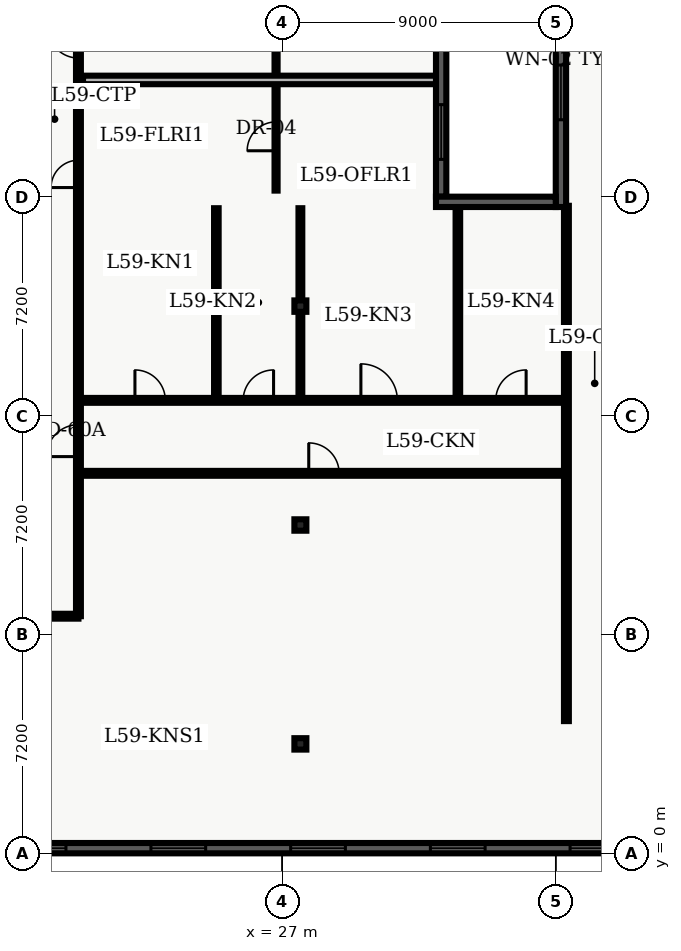
"""IFC4 building model, lengths in metres.
Left out: names, types, materials, properties, quantities, classifications, styles, units other than length and angle.
Written with IfcOpenShell. Run it as: python <this file> out.ifc"""

import sys

from ifc_helpers import new_model, entity, si_unit, converted_unit, direction, frame, origin_with_axes, origin_2d_with_axis, place, context, subcontext, project, spatial, polyline, rectangle, i_section, outline, extrude, element, fill, save


model = new_model("IFC4")
c1 = context("Model", 3, precision=1e-05, world=origin_with_axes(), true_north=direction((0.0, 1.0)))
c2 = subcontext(c1, "Body", "Model", "MODEL_VIEW")
j1 = project(units=[si_unit("LENGTHUNIT", "METRE"), converted_unit("PLANEANGLEUNIT", "DEGREE", entity("IfcPlaneAngleMeasure", 0.017), si_unit("PLANEANGLEUNIT", "RADIAN"), dimensions=[0, 0, 0, 0, 0, 0, 0])], contexts=[c1])
p1 = place(None, origin_with_axes())
s1 = spatial("IfcSite", under=j1, at=p1, CompositionType="ELEMENT")
p2 = place(p1, origin_with_axes())
s2 = spatial("IfcBuilding", under=s1, at=p2, CompositionType="ELEMENT")
p3 = place(p2, frame((0.0, 0.0, 240.3), z_axis=(0.0, 0.0, 1.0), x_axis=(1.0, 0.0, 0.0)))
s3 = spatial("IfcBuildingStorey", under=s2, at=p3, CompositionType="ELEMENT", Elevation=240.3)
for number, where, z_axis, x_axis in (
    (1, (27.6, 3.6, 0.0), (0.0, 0.0, 1.0), (1.0, 0.0, 0.0)),
    (2, (27.6, 10.8, 0.0), (0.0, 0.0, 1.0), (1.0, 0.0, 0.0)),
    (3, (27.6, 18.0, 0.0), (0.0, 0.0, 1.0), (1.0, 0.0, 0.0)),
):
    element("IfcColumn", number, at=place(p3, frame(where, z_axis=z_axis, x_axis=x_axis)), inside=s3, PredefinedType="COLUMN", context=c2, shape_type="SweptSolid", body=[
        extrude(i_section(OverallWidth=0.394, OverallDepth=0.375, WebThickness=0.017, FlangeThickness=0.028, FilletRadius=0.02, at=origin_2d_with_axis()), origin_with_axes(), (0.0, 0.0, 1.0), 3.9),
    ])
p4 = place(p3, frame((7.1, 7.8, 0.0), z_axis=(0.0, 0.0, 1.0), x_axis=(1.0, 0.0, 0.0)))
e4 = element("IfcWall", 4, at=p4, inside=s3, PredefinedType="PARTITIONING", context=c2, shape_type="SweptSolid", body=[
    extrude(outline(polyline([(0.0, -0.08), (13.2, -0.08), (13.2, 0.08), (0.0, 0.08), (0.0, -0.08)])), origin_with_axes(), (0.0, 0.0, 1.0), 2.7),
])
p5 = place(p4, frame((6.57, 0.0, 0.0), z_axis=(0.0, 0.0, 1.0), x_axis=(1.0, 0.0, 0.0)))
e5 = element("IfcOpeningElement", 5, at=p5, cuts=e4, PredefinedType="OPENING", context=c2, shape_type="SweptSolid", body=[
    extrude(rectangle(XDim=1.2, YDim=0.18, at=origin_2d_with_axis()), origin_with_axes(), (0.0, 0.0, 1.0), 2.2),
])
p6 = place(p3, frame((20.3, 7.8, 0.0), z_axis=(0.0, 0.0, 1.0), x_axis=(0.0, 1.0, 0.0)))
e6 = element("IfcWall", 6, at=p6, inside=s3, PredefinedType="PARTITIONING", context=c2, shape_type="SweptSolid", body=[
    extrude(outline(polyline([(0.0, -0.08), (32.7, -0.08), (32.7, 0.08), (0.0, 0.08), (0.0, -0.08)])), origin_with_axes(), (0.0, 0.0, 1.0), 2.7),
])
p7 = place(p6, frame((14.55, 0.0, 0.0), z_axis=(0.0, 0.0, 1.0), x_axis=(1.0, 0.0, 0.0)))
e7 = element("IfcOpeningElement", 7, at=p7, cuts=e6, PredefinedType="OPENING", context=c2, shape_type="SweptSolid", body=[
    extrude(rectangle(XDim=0.9, YDim=0.18, at=origin_2d_with_axis()), origin_with_axes(), (0.0, 0.0, 1.0), 2.15),
])
p8 = place(p6, frame((18.86, 0.0, 0.0), z_axis=(0.0, 0.0, 1.0), x_axis=(1.0, 0.0, 0.0)))
e8 = element("IfcOpeningElement", 8, at=p8, cuts=e6, PredefinedType="OPENING", context=c2, shape_type="SweptSolid", body=[
    extrude(rectangle(XDim=1.0, YDim=0.18, at=origin_2d_with_axis()), origin_with_axes(), (0.0, 0.0, 1.0), 2.15),
])
p9 = place(p6, frame((24.276, 0.0, 0.0), z_axis=(0.0, 0.0, 1.0), x_axis=(1.0, 0.0, 0.0)))
e9 = element("IfcOpeningElement", 9, at=p9, cuts=e6, PredefinedType="OPENING", context=c2, shape_type="SweptSolid", body=[
    extrude(rectangle(XDim=1.0, YDim=0.18, at=origin_2d_with_axis()), origin_with_axes(), (0.0, 0.0, 1.0), 2.15),
])
p10 = place(p6, frame((27.491, 0.0, 0.0), z_axis=(0.0, 0.0, 1.0), x_axis=(1.0, 0.0, 0.0)))
e10 = element("IfcOpeningElement", 10, at=p10, cuts=e6, PredefinedType="OPENING", context=c2, shape_type="SweptSolid", body=[
    extrude(rectangle(XDim=1.0, YDim=0.18, at=origin_2d_with_axis()), origin_with_axes(), (0.0, 0.0, 1.0), 2.15),
])
p11 = place(p6, frame((5.775, 0.0, 0.0), z_axis=(0.0, 0.0, 1.0), x_axis=(1.0, 0.0, 0.0)))
e11 = element("IfcOpeningElement", 11, at=p11, cuts=e6, PredefinedType="OPENING", context=c2, shape_type="SweptSolid", body=[
    extrude(rectangle(XDim=1.05, YDim=0.18, at=origin_2d_with_axis()), origin_with_axes(), (0.0, 0.0, 1.0), 2.15),
])
p12 = place(p3, frame((26.8, 21.8, 0.0), z_axis=(0.0, 0.0, 1.0), x_axis=(0.0, 1.0, 0.0)))
e12 = element("IfcWall", 12, at=p12, inside=s3, PredefinedType="PARTITIONING", context=c2, shape_type="SweptSolid", body=[
    extrude(outline(polyline([(0.0, -0.05), (18.5, -0.05), (18.5, 0.05), (0.0, 0.05), (0.0, -0.05)])), origin_with_axes(), (0.0, 0.0, 1.0), 2.7),
])
p13 = place(p12, frame((1.785, 0.0, 0.0), z_axis=(0.0, 0.0, 1.0), x_axis=(1.0, 0.0, 0.0)))
e13 = element("IfcOpeningElement", 13, at=p13, cuts=e12, PredefinedType="OPENING", context=c2, shape_type="SweptSolid", body=[
    extrude(rectangle(XDim=0.95, YDim=0.12, at=origin_2d_with_axis()), origin_with_axes(), (0.0, 0.0, 1.0), 2.15),
])
p14 = place(p12, frame((5.739, 0.0, 0.0), z_axis=(0.0, 0.0, 1.0), x_axis=(1.0, 0.0, 0.0)))
e14 = element("IfcOpeningElement", 14, at=p14, cuts=e12, PredefinedType="OPENING", context=c2, shape_type="SweptSolid", body=[
    extrude(rectangle(XDim=0.95, YDim=0.12, at=origin_2d_with_axis()), origin_with_axes(), (0.0, 0.0, 1.0), 2.15),
])
p15 = place(p12, frame((10.275, 0.0, 0.0), z_axis=(0.0, 0.0, 1.0), x_axis=(1.0, 0.0, 0.0)))
e15 = element("IfcOpeningElement", 15, at=p15, cuts=e12, PredefinedType="OPENING", context=c2, shape_type="SweptSolid", body=[
    extrude(rectangle(XDim=0.95, YDim=0.12, at=origin_2d_with_axis()), origin_with_axes(), (0.0, 0.0, 1.0), 2.15),
])
p16 = place(p12, frame((15.641, 0.0, 0.0), z_axis=(0.0, 0.0, 1.0), x_axis=(1.0, 0.0, 0.0)))
e16 = element("IfcOpeningElement", 16, at=p16, cuts=e12, PredefinedType="OPENING", context=c2, shape_type="SweptSolid", body=[
    extrude(rectangle(XDim=0.95, YDim=0.12, at=origin_2d_with_axis()), origin_with_axes(), (0.0, 0.0, 1.0), 2.15),
])
p17 = place(p3, frame((20.45, 25.44, 0.0), z_axis=(0.0, 0.0, 1.0), x_axis=(1.0, 0.0, 0.0)))
e17 = element("IfcWall", 17, at=p17, inside=s3, PredefinedType="PARTITIONING", context=c2, shape_type="SweptSolid", body=[
    extrude(outline(polyline([(0.0, -0.14), (11.615, -0.14), (11.615, 0.14), (0.0, 0.14), (0.0, -0.14)])), origin_with_axes(), (0.0, 0.0, 1.0), 2.7),
])
p18 = place(p3, frame((20.3, 12.5, 0.0), z_axis=(0.0, 0.0, 1.0), x_axis=(1.0, 0.0, 0.0)))
e18 = element("IfcWall", 18, at=p18, inside=s3, PredefinedType="PARTITIONING", context=c2, shape_type="SweptSolid", body=[
    extrude(outline(polyline([(0.0, -0.08), (16.05, -0.08), (16.05, 0.08), (0.0, 0.08), (0.0, -0.08)])), origin_with_axes(), (0.0, 0.0, 1.0), 2.7),
])
p19 = place(p18, frame((8.075, 0.0, 0.0), z_axis=(0.0, 0.0, 1.0), x_axis=(1.0, 0.0, 0.0)))
e19 = element("IfcOpeningElement", 19, at=p19, cuts=e18, PredefinedType="OPENING", context=c2, shape_type="SweptSolid", body=[
    extrude(rectangle(XDim=1.0, YDim=0.18, at=origin_2d_with_axis()), origin_with_axes(), (0.0, 0.0, 1.0), 2.15),
])
p20 = place(p3, frame((20.3, 14.9, 0.0), z_axis=(0.0, 0.0, 1.0), x_axis=(1.0, 0.0, 0.0)))
e20 = element("IfcWall", 20, at=p20, inside=s3, PredefinedType="PARTITIONING", context=c2, shape_type="SweptSolid", body=[
    extrude(outline(polyline([(0.0, -0.08), (16.05, -0.08), (16.05, 0.08), (0.0, 0.08), (0.0, -0.08)])), origin_with_axes(), (0.0, 0.0, 1.0), 2.7),
])
p21 = place(p20, frame((2.358, 0.0, 0.0), z_axis=(0.0, 0.0, 1.0), x_axis=(1.0, 0.0, 0.0)))
e21 = element("IfcOpeningElement", 21, at=p21, cuts=e20, PredefinedType="OPENING", context=c2, shape_type="SweptSolid", body=[
    extrude(rectangle(XDim=1.0, YDim=0.18, at=origin_2d_with_axis()), origin_with_axes(), (0.0, 0.0, 1.0), 2.15),
])
p22 = place(p20, frame((5.918, 0.0, 0.0), z_axis=(0.0, 0.0, 1.0), x_axis=(1.0, 0.0, 0.0)))
e22 = element("IfcOpeningElement", 22, at=p22, cuts=e20, PredefinedType="OPENING", context=c2, shape_type="SweptSolid", body=[
    extrude(rectangle(XDim=1.0, YDim=0.18, at=origin_2d_with_axis()), origin_with_axes(), (0.0, 0.0, 1.0), 2.15),
])
p23 = place(p20, frame((9.89, 0.0, 0.0), z_axis=(0.0, 0.0, 1.0), x_axis=(1.0, 0.0, 0.0)))
e23 = element("IfcOpeningElement", 23, at=p23, cuts=e20, PredefinedType="OPENING", context=c2, shape_type="SweptSolid", body=[
    extrude(rectangle(XDim=1.2, YDim=0.18, at=origin_2d_with_axis()), origin_with_axes(), (0.0, 0.0, 1.0), 2.2),
])
p24 = place(p20, frame((14.225, 0.0, 0.0), z_axis=(0.0, 0.0, 1.0), x_axis=(1.0, 0.0, 0.0)))
e24 = element("IfcOpeningElement", 24, at=p24, cuts=e20, PredefinedType="OPENING", context=c2, shape_type="SweptSolid", body=[
    extrude(rectangle(XDim=1.0, YDim=0.18, at=origin_2d_with_axis()), origin_with_axes(), (0.0, 0.0, 1.0), 2.15),
])
p25 = place(p3, frame((36.35, 4.35, 0.0), z_axis=(0.0, 0.0, 1.0), x_axis=(0.0, 1.0, 0.0)))
e25 = element("IfcWall", 25, at=p25, inside=s3, PredefinedType="PARTITIONING", context=c2, shape_type="SweptSolid", body=[
    extrude(outline(polyline([(0.0, -0.08), (16.95, -0.08), (16.95, 0.08), (0.0, 0.08), (0.0, -0.08)])), origin_with_axes(), (0.0, 0.0, 1.0), 2.7),
])
p26 = place(p3, frame((24.836, 15.02, 0.0), z_axis=(0.0, 0.0, 1.0), x_axis=(0.0, 1.0, 0.0)))
e26 = element("IfcWall", 26, at=p26, inside=s3, PredefinedType="PARTITIONING", context=c2, shape_type="SweptSolid", body=[
    extrude(outline(polyline([(0.0, -0.075), (6.2, -0.075), (6.2, 0.075), (0.0, 0.075), (0.0, -0.075)])), origin_with_axes(), (0.0, 0.0, 1.0), 2.7),
])
p27 = place(p3, frame((27.6, 15.02, 0.0), z_axis=(0.0, 0.0, 1.0), x_axis=(0.0, 1.0, 0.0)))
e27 = element("IfcWall", 27, at=p27, inside=s3, PredefinedType="PARTITIONING", context=c2, shape_type="SweptSolid", body=[
    extrude(outline(polyline([(0.0, -0.062), (6.2, -0.062), (6.2, 0.062), (0.0, 0.062), (0.0, -0.062)])), origin_with_axes(), (0.0, 0.0, 1.0), 2.7),
])
p28 = place(p3, frame((32.78, 15.02, 0.0), z_axis=(0.0, 0.0, 1.0), x_axis=(0.0, 1.0, 0.0)))
e28 = element("IfcWall", 28, at=p28, inside=s3, PredefinedType="PARTITIONING", context=c2, shape_type="SweptSolid", body=[
    extrude(outline(polyline([(0.0, -0.075), (6.245, -0.075), (6.245, 0.075), (0.0, 0.075), (0.0, -0.075)])), origin_with_axes(), (0.0, 0.0, 1.0), 2.7),
])
p29 = place(p3, frame((36.17, 21.26, 0.0), z_axis=(0.0, 0.0, 1.0), x_axis=(0.0, 1.0, 0.0)))
e29 = element("IfcWall", 29, at=p29, inside=s3, PredefinedType="SOLIDWALL", context=c2, shape_type="SweptSolid", body=[
    extrude(outline(polyline([(0.0, -0.17), (7.54, -0.17), (7.54, 0.17), (0.0, 0.17), (0.0, -0.17)])), origin_with_axes(), (0.0, 0.0, 1.0), 3.66),
])
p30 = place(p29, frame((3.77, 0.0, 0.45), z_axis=(0.0, 0.0, 1.0), x_axis=(1.0, 0.0, 0.0)))
e30 = element("IfcOpeningElement", 30, at=p30, cuts=e29, PredefinedType="OPENING", context=c2, shape_type="SweptSolid", body=[
    extrude(rectangle(XDim=1.8, YDim=0.36, at=origin_2d_with_axis()), origin_with_axes(), (0.0, 0.0, 1.0), 2.1),
])
p31 = place(p3, frame((49.46, 0.17, 0.0), z_axis=(0.0, 0.0, 1.0), x_axis=(-1.0, 0.0, 0.0)))
e31 = element("IfcWall", 31, at=p31, inside=s3, PredefinedType="SOLIDWALL", context=c2, shape_type="SweptSolid", body=[
    extrude(outline(polyline([(0.0, -0.17), (42.56, -0.17), (42.56, 0.17), (0.0, 0.17), (0.0, -0.17)])), origin_with_axes(), (0.0, 0.0, 1.0), 3.66),
])
p32 = place(p31, frame((2.898, 0.0, 0.45), z_axis=(0.0, 0.0, 1.0), x_axis=(1.0, 0.0, 0.0)))
e32 = element("IfcOpeningElement", 32, at=p32, cuts=e31, PredefinedType="OPENING", context=c2, shape_type="SweptSolid", body=[
    extrude(rectangle(XDim=1.8, YDim=0.36, at=origin_2d_with_axis()), origin_with_axes(), (0.0, 0.0, 1.0), 2.1),
])
p33 = place(p31, frame((7.493, 0.0, 0.45), z_axis=(0.0, 0.0, 1.0), x_axis=(1.0, 0.0, 0.0)))
e33 = element("IfcOpeningElement", 33, at=p33, cuts=e31, PredefinedType="OPENING", context=c2, shape_type="SweptSolid", body=[
    extrude(rectangle(XDim=1.8, YDim=0.36, at=origin_2d_with_axis()), origin_with_axes(), (0.0, 0.0, 1.0), 2.1),
])
p34 = place(p31, frame((12.089, 0.0, 0.45), z_axis=(0.0, 0.0, 1.0), x_axis=(1.0, 0.0, 0.0)))
e34 = element("IfcOpeningElement", 34, at=p34, cuts=e31, PredefinedType="OPENING", context=c2, shape_type="SweptSolid", body=[
    extrude(rectangle(XDim=1.8, YDim=0.36, at=origin_2d_with_axis()), origin_with_axes(), (0.0, 0.0, 1.0), 2.1),
])
p35 = place(p31, frame((16.684, 0.0, 0.45), z_axis=(0.0, 0.0, 1.0), x_axis=(1.0, 0.0, 0.0)))
e35 = element("IfcOpeningElement", 35, at=p35, cuts=e31, PredefinedType="OPENING", context=c2, shape_type="SweptSolid", body=[
    extrude(rectangle(XDim=1.8, YDim=0.36, at=origin_2d_with_axis()), origin_with_axes(), (0.0, 0.0, 1.0), 2.1),
])
p36 = place(p31, frame((21.28, 0.0, 0.45), z_axis=(0.0, 0.0, 1.0), x_axis=(1.0, 0.0, 0.0)))
e36 = element("IfcOpeningElement", 36, at=p36, cuts=e31, PredefinedType="OPENING", context=c2, shape_type="SweptSolid", body=[
    extrude(rectangle(XDim=1.8, YDim=0.36, at=origin_2d_with_axis()), origin_with_axes(), (0.0, 0.0, 1.0), 2.1),
])
p37 = place(p31, frame((25.876, 0.0, 0.45), z_axis=(0.0, 0.0, 1.0), x_axis=(1.0, 0.0, 0.0)))
e37 = element("IfcOpeningElement", 37, at=p37, cuts=e31, PredefinedType="OPENING", context=c2, shape_type="SweptSolid", body=[
    extrude(rectangle(XDim=1.8, YDim=0.36, at=origin_2d_with_axis()), origin_with_axes(), (0.0, 0.0, 1.0), 2.1),
])
p38 = place(p31, frame((30.471, 0.0, 0.45), z_axis=(0.0, 0.0, 1.0), x_axis=(1.0, 0.0, 0.0)))
e38 = element("IfcOpeningElement", 38, at=p38, cuts=e31, PredefinedType="OPENING", context=c2, shape_type="SweptSolid", body=[
    extrude(rectangle(XDim=1.8, YDim=0.36, at=origin_2d_with_axis()), origin_with_axes(), (0.0, 0.0, 1.0), 2.1),
])
p39 = place(p31, frame((35.067, 0.0, 0.45), z_axis=(0.0, 0.0, 1.0), x_axis=(1.0, 0.0, 0.0)))
e39 = element("IfcOpeningElement", 39, at=p39, cuts=e31, PredefinedType="OPENING", context=c2, shape_type="SweptSolid", body=[
    extrude(rectangle(XDim=1.8, YDim=0.36, at=origin_2d_with_axis()), origin_with_axes(), (0.0, 0.0, 1.0), 2.1),
])
p40 = place(p31, frame((39.662, 0.0, 0.45), z_axis=(0.0, 0.0, 1.0), x_axis=(1.0, 0.0, 0.0)))
e40 = element("IfcOpeningElement", 40, at=p40, cuts=e31, PredefinedType="OPENING", context=c2, shape_type="SweptSolid", body=[
    extrude(rectangle(XDim=1.8, YDim=0.36, at=origin_2d_with_axis()), origin_with_axes(), (0.0, 0.0, 1.0), 2.1),
])
p41 = place(p3, frame((32.23, 41.82, 0.0), z_axis=(0.0, 0.0, 1.0), x_axis=(0.0, -1.0, 0.0)))
e41 = element("IfcWall", 41, at=p41, inside=s3, PredefinedType="SOLIDWALL", context=c2, shape_type="SweptSolid", body=[
    extrude(outline(polyline([(0.0, -0.17), (20.22, -0.17), (20.22, 0.17), (0.0, 0.17), (0.0, -0.17)])), origin_with_axes(), (0.0, 0.0, 1.0), 3.66),
])
p42 = place(p41, frame((2.978, 0.0, 0.45), z_axis=(0.0, 0.0, 1.0), x_axis=(1.0, 0.0, 0.0)))
e42 = element("IfcOpeningElement", 42, at=p42, cuts=e41, PredefinedType="OPENING", context=c2, shape_type="SweptSolid", body=[
    extrude(rectangle(XDim=1.8, YDim=0.36, at=origin_2d_with_axis()), origin_with_axes(), (0.0, 0.0, 1.0), 2.1),
])
p43 = place(p41, frame((18.093, 0.0, 0.45), z_axis=(0.0, 0.0, 1.0), x_axis=(1.0, 0.0, 0.0)))
e43 = element("IfcOpeningElement", 43, at=p43, cuts=e41, PredefinedType="OPENING", context=c2, shape_type="SweptSolid", body=[
    extrude(rectangle(XDim=1.8, YDim=0.36, at=origin_2d_with_axis()), origin_with_axes(), (0.0, 0.0, 1.0), 2.1),
])
p44 = place(p3, frame((32.06, 21.43, 0.0), z_axis=(0.0, 0.0, 1.0), x_axis=(1.0, 0.0, 0.0)))
e44 = element("IfcWall", 44, at=p44, inside=s3, PredefinedType="SOLIDWALL", context=c2, shape_type="SweptSolid", body=[
    extrude(outline(polyline([(0.0, -0.17), (3.94, -0.17), (3.94, 0.17), (0.0, 0.17), (0.0, -0.17)])), origin_with_axes(), (0.0, 0.0, 1.0), 3.66),
])
p45 = place(p12, frame((1.785, 0.0, 0.0), z_axis=(0.0, 0.0, 1.0), x_axis=(1.0, 0.0, 0.0)))
e45 = element("IfcDoor", 45, at=p45, inside=s3, OperationType="SINGLE_SWING_LEFT", PredefinedType="DOOR", context=c2, shape_type="SweptSolid", body=[
    extrude(rectangle(XDim=0.95, YDim=0.06, at=origin_2d_with_axis()), origin_with_axes(), (0.0, 0.0, 1.0), 2.15),
])
fill(e13, e45)
p46 = place(p6, frame((14.55, 0.0, 0.0), z_axis=(0.0, 0.0, 1.0), x_axis=(1.0, 0.0, 0.0)))
e46 = element("IfcDoor", 46, at=p46, inside=s3, OperationType="SINGLE_SWING_LEFT", PredefinedType="DOOR", context=c2, shape_type="SweptSolid", body=[
    extrude(rectangle(XDim=0.9, YDim=0.09, at=origin_2d_with_axis()), origin_with_axes(), (0.0, 0.0, 1.0), 2.15),
])
fill(e7, e46)
p47 = place(p6, frame((18.86, 0.0, 0.0), z_axis=(0.0, 0.0, 1.0), x_axis=(1.0, 0.0, 0.0)))
e47 = element("IfcDoor", 47, at=p47, inside=s3, OperationType="SINGLE_SWING_RIGHT", PredefinedType="DOOR", context=c2, shape_type="SweptSolid", body=[
    extrude(rectangle(XDim=1.0, YDim=0.09, at=origin_2d_with_axis()), origin_with_axes(), (0.0, 0.0, 1.0), 2.15),
])
fill(e8, e47)
p48 = place(p6, frame((5.775, 0.0, 0.0), z_axis=(0.0, 0.0, 1.0), x_axis=(1.0, 0.0, 0.0)))
e48 = element("IfcDoor", 48, at=p48, inside=s3, OperationType="SINGLE_SWING_LEFT", PredefinedType="DOOR", context=c2, shape_type="SweptSolid", body=[
    extrude(rectangle(XDim=1.05, YDim=0.09, at=origin_2d_with_axis()), origin_with_axes(), (0.0, 0.0, 1.0), 2.15),
])
fill(e11, e48)
p49 = place(p18, frame((8.075, 0.0, 0.0), z_axis=(0.0, 0.0, 1.0), x_axis=(1.0, 0.0, 0.0)))
e49 = element("IfcDoor", 49, at=p49, inside=s3, OperationType="SINGLE_SWING_LEFT", PredefinedType="DOOR", context=c2, shape_type="SweptSolid", body=[
    extrude(rectangle(XDim=1.0, YDim=0.09, at=origin_2d_with_axis()), origin_with_axes(), (0.0, 0.0, 1.0), 2.15),
])
fill(e19, e49)
p50 = place(p20, frame((2.358, 0.0, 0.0), z_axis=(0.0, 0.0, 1.0), x_axis=(1.0, 0.0, 0.0)))
e50 = element("IfcDoor", 50, at=p50, inside=s3, OperationType="SINGLE_SWING_LEFT", PredefinedType="DOOR", context=c2, shape_type="SweptSolid", body=[
    extrude(rectangle(XDim=1.0, YDim=0.09, at=origin_2d_with_axis()), origin_with_axes(), (0.0, 0.0, 1.0), 2.15),
])
fill(e21, e50)
p51 = place(p20, frame((5.918, 0.0, 0.0), z_axis=(0.0, 0.0, 1.0), x_axis=(1.0, 0.0, 0.0)))
e51 = element("IfcDoor", 51, at=p51, inside=s3, OperationType="SINGLE_SWING_RIGHT", PredefinedType="DOOR", context=c2, shape_type="SweptSolid", body=[
    extrude(rectangle(XDim=1.0, YDim=0.09, at=origin_2d_with_axis()), origin_with_axes(), (0.0, 0.0, 1.0), 2.15),
])
fill(e22, e51)
p52 = place(p20, frame((9.89, 0.0, 0.0), z_axis=(0.0, 0.0, 1.0), x_axis=(1.0, 0.0, 0.0)))
e52 = element("IfcDoor", 52, at=p52, inside=s3, OperationType="SINGLE_SWING_LEFT", PredefinedType="DOOR", context=c2, shape_type="SweptSolid", body=[
    extrude(rectangle(XDim=1.2, YDim=0.09, at=origin_2d_with_axis()), origin_with_axes(), (0.0, 0.0, 1.0), 2.2),
])
fill(e23, e52)
p53 = place(p20, frame((14.225, 0.0, 0.0), z_axis=(0.0, 0.0, 1.0), x_axis=(1.0, 0.0, 0.0)))
e53 = element("IfcDoor", 53, at=p53, inside=s3, OperationType="SINGLE_SWING_RIGHT", PredefinedType="DOOR", context=c2, shape_type="SweptSolid", body=[
    extrude(rectangle(XDim=1.0, YDim=0.09, at=origin_2d_with_axis()), origin_with_axes(), (0.0, 0.0, 1.0), 2.15),
])
fill(e24, e53)
p54 = place(p29, frame((3.77, 0.0, 0.45), z_axis=(0.0, 0.0, 1.0), x_axis=(1.0, 0.0, 0.0)))
e54 = element("IfcWindow", 54, at=p54, inside=s3, PredefinedType="WINDOW", context=c2, shape_type="SweptSolid", body=[
    extrude(rectangle(XDim=1.8, YDim=0.09, at=origin_2d_with_axis()), origin_with_axes(), (0.0, 0.0, 1.0), 2.1),
])
fill(e30, e54)
p55 = place(p31, frame((12.089, 0.0, 0.45), z_axis=(0.0, 0.0, 1.0), x_axis=(1.0, 0.0, 0.0)))
e55 = element("IfcWindow", 55, at=p55, inside=s3, PredefinedType="WINDOW", context=c2, shape_type="SweptSolid", body=[
    extrude(rectangle(XDim=1.8, YDim=0.09, at=origin_2d_with_axis()), origin_with_axes(), (0.0, 0.0, 1.0), 2.1),
])
fill(e34, e55)
p56 = place(p31, frame((16.684, 0.0, 0.45), z_axis=(0.0, 0.0, 1.0), x_axis=(1.0, 0.0, 0.0)))
e56 = element("IfcWindow", 56, at=p56, inside=s3, PredefinedType="WINDOW", context=c2, shape_type="SweptSolid", body=[
    extrude(rectangle(XDim=1.8, YDim=0.09, at=origin_2d_with_axis()), origin_with_axes(), (0.0, 0.0, 1.0), 2.1),
])
fill(e35, e56)
p57 = place(p31, frame((21.28, 0.0, 0.45), z_axis=(0.0, 0.0, 1.0), x_axis=(1.0, 0.0, 0.0)))
e57 = element("IfcWindow", 57, at=p57, inside=s3, PredefinedType="WINDOW", context=c2, shape_type="SweptSolid", body=[
    extrude(rectangle(XDim=1.8, YDim=0.09, at=origin_2d_with_axis()), origin_with_axes(), (0.0, 0.0, 1.0), 2.1),
])
fill(e36, e57)
p58 = place(p31, frame((25.876, 0.0, 0.45), z_axis=(0.0, 0.0, 1.0), x_axis=(1.0, 0.0, 0.0)))
e58 = element("IfcWindow", 58, at=p58, inside=s3, PredefinedType="WINDOW", context=c2, shape_type="SweptSolid", body=[
    extrude(rectangle(XDim=1.8, YDim=0.09, at=origin_2d_with_axis()), origin_with_axes(), (0.0, 0.0, 1.0), 2.1),
])
fill(e37, e58)
p59 = place(p31, frame((30.471, 0.0, 0.45), z_axis=(0.0, 0.0, 1.0), x_axis=(1.0, 0.0, 0.0)))
e59 = element("IfcWindow", 59, at=p59, inside=s3, PredefinedType="WINDOW", context=c2, shape_type="SweptSolid", body=[
    extrude(rectangle(XDim=1.8, YDim=0.09, at=origin_2d_with_axis()), origin_with_axes(), (0.0, 0.0, 1.0), 2.1),
])
fill(e38, e59)
p60 = place(p41, frame((18.093, 0.0, 0.45), z_axis=(0.0, 0.0, 1.0), x_axis=(1.0, 0.0, 0.0)))
e60 = element("IfcWindow", 60, at=p60, inside=s3, PredefinedType="WINDOW", context=c2, shape_type="SweptSolid", body=[
    extrude(rectangle(XDim=1.8, YDim=0.09, at=origin_2d_with_axis()), origin_with_axes(), (0.0, 0.0, 1.0), 2.1),
])
fill(e43, e60)
save(model, sys.argv[1])
